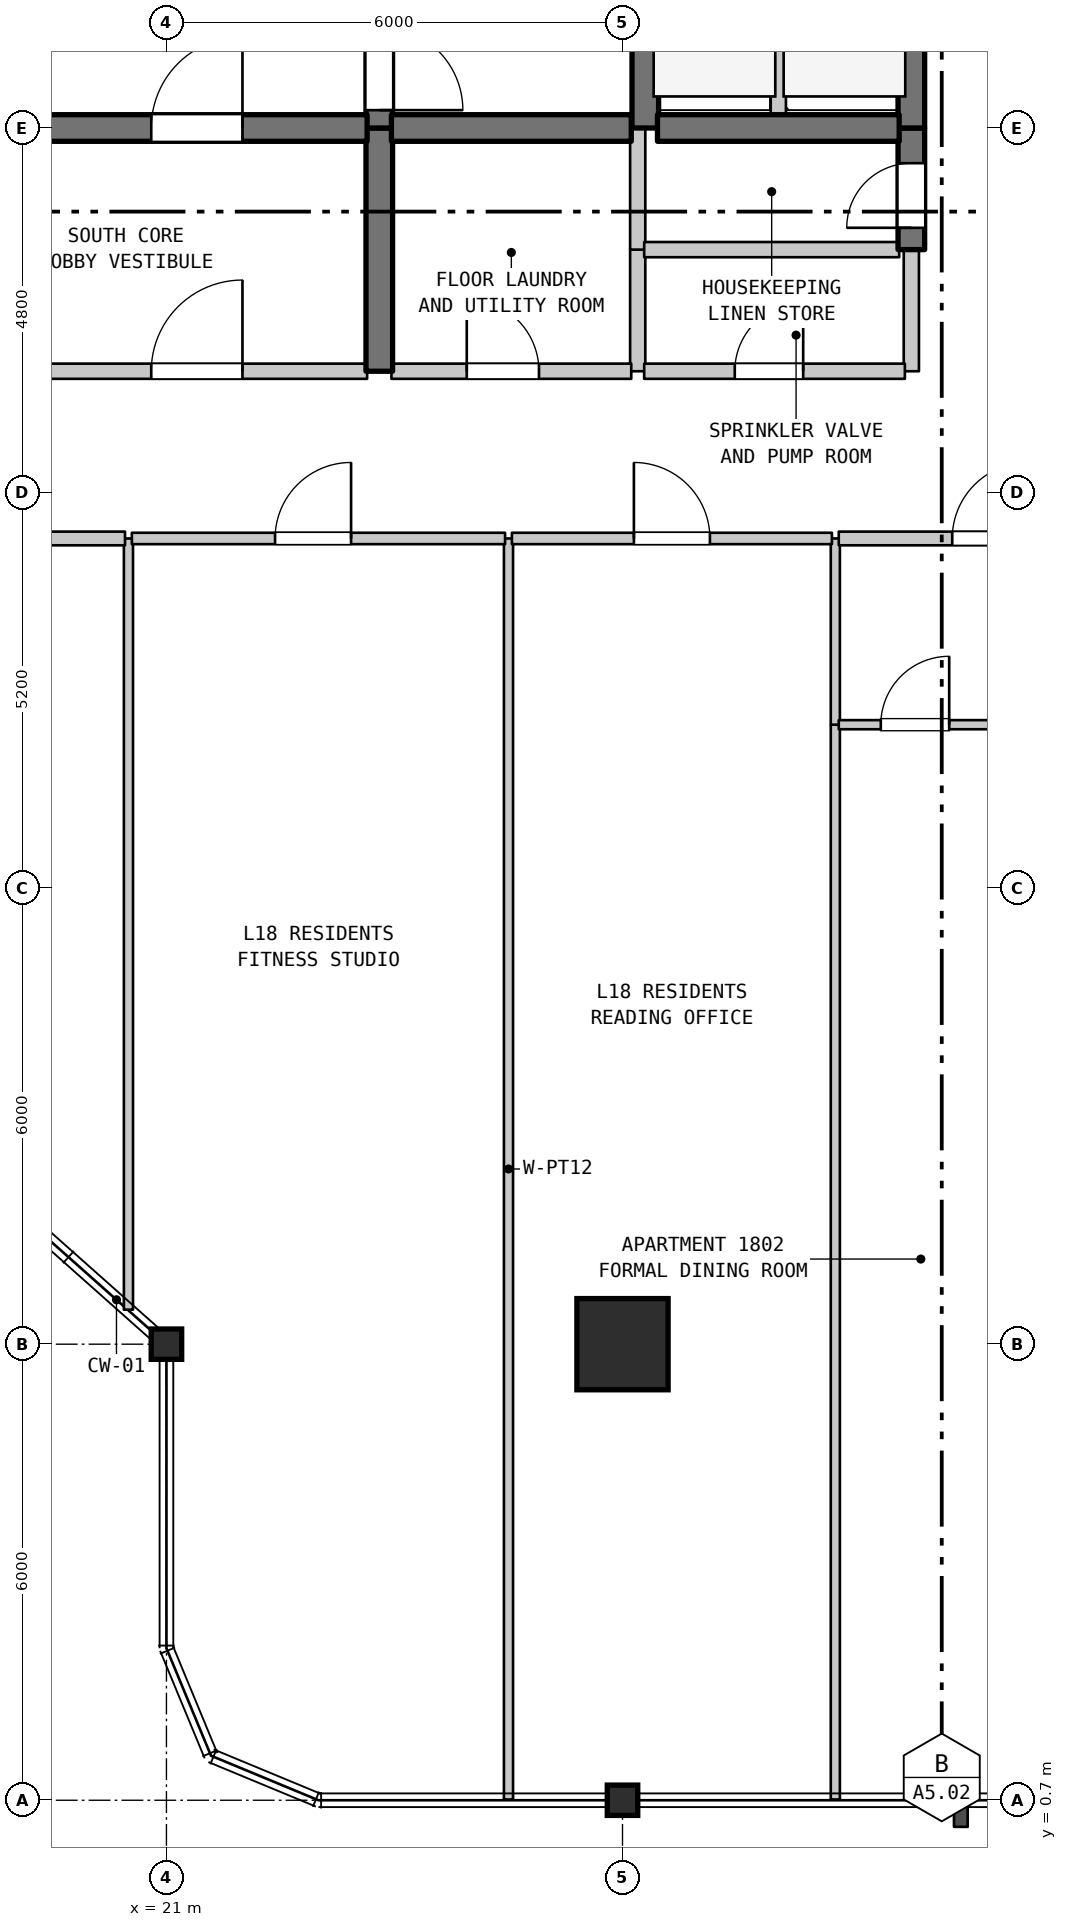
"""IFC4 building model, lengths in metres.
Left out: names, types, materials, properties, quantities, classifications, styles, units other than length and angle.
Written with IfcOpenShell. Run it as: python <this file> out.ifc"""

import sys

from ifc_helpers import new_model, si_unit, direction, frame, frame_2d, origin, origin_2d, place, context, subcontext, project, spatial, rectangle, i_section, extrude, element, fill, save


model = new_model("IFC4")
c1 = context("Model", 3, precision=1e-05, world=origin(), true_north=direction((0.0, 1.0)))
c2 = subcontext(c1, "Body", "Model", "MODEL_VIEW")
j1 = project(units=[si_unit("LENGTHUNIT", "METRE"), si_unit("PLANEANGLEUNIT", "RADIAN")], contexts=[c1])
p1 = place(None, origin())
s1 = spatial("IfcSite", under=j1, at=p1, CompositionType="ELEMENT")
p2 = place(p1, origin())
s2 = spatial("IfcBuilding", under=s1, at=p2, CompositionType="ELEMENT")
p3 = place(p2, frame((0.0, 0.0, 77.5)))
s3 = spatial("IfcBuildingStorey", under=s2, at=p3, CompositionType="ELEMENT", Elevation=77.5)
for number, where, z_axis, x_axis in (
    (1, (21.0, 6.7, 0.0), (0.0, 0.0, 1.0), (1.0, 0.0, 0.0)),
    (2, (27.0, 0.7, 0.0), (0.0, 0.0, 1.0), (1.0, 0.0, 0.0)),
):
    element("IfcColumn", number, at=place(p3, frame(where, z_axis=z_axis, x_axis=x_axis)), inside=s3, PredefinedType="COLUMN", context=c2, shape_type="SweptSolid", body=[
        extrude(i_section(OverallWidth=0.401, OverallDepth=0.399, WebThickness=0.025, FlangeThickness=0.04, FilletRadius=0.015, at=origin_2d()), origin(), (0.0, 0.0, 1.0), 3.7),
    ])
p4 = place(p3, frame((27.0, 6.7, 0.0), z_axis=(0.0, 0.0, 1.0), x_axis=(1.0, 0.0, 0.0)))
e3 = element("IfcColumn", 3, at=p4, inside=s3, PredefinedType="COLUMN", context=c2, shape_type="SweptSolid", body=[
    extrude(rectangle(XDim=1.2, YDim=1.2, at=origin_2d()), origin(), (0.0, 0.0, 1.0), 3.7),
])
p5 = place(p3, frame((20.5, 7.154, 0.0), z_axis=(0.0, 0.0, 1.0), x_axis=(0.0, 1.0, 0.0)))
e4 = element("IfcWall", 4, at=p5, inside=s3, PredefinedType="PARTITIONING", context=c2, shape_type="SweptSolid", body=[
    extrude(rectangle(XDim=10.146, YDim=0.12, at=frame_2d((5.073, 0.0))), origin(), (0.0, 0.0, 1.0), 3.28),
])
p6 = place(p3, frame((23.8, 19.5, 0.0), z_axis=(0.0, 0.0, 1.0), x_axis=(0.0, 1.0, 0.0)))
e5 = element("IfcWall", 5, at=p6, inside=s3, PredefinedType="SHEAR", context=c2, shape_type="SweptSolid", body=[
    extrude(rectangle(XDim=3.2, YDim=0.35, at=frame_2d((1.6, 0.0))), origin(), (0.0, 0.0, 1.0), 3.28),
])
p7 = place(p3, frame((23.8, 22.7, 0.0), z_axis=(0.0, 0.0, 1.0), x_axis=(0.0, 1.0, 0.0)))
e6 = element("IfcWall", 6, at=p7, inside=s3, PredefinedType="SHEAR", context=c2, shape_type="SweptSolid", body=[
    extrude(rectangle(XDim=5.5, YDim=0.35, at=frame_2d((2.75, 0.0))), origin(), (0.0, 0.0, 1.0), 3.28),
])
p8 = place(p7, frame((0.235, 0.0, 0.0)))
e7 = element("IfcOpeningElement", 7, at=p8, cuts=e6, PredefinedType="OPENING", context=c2, shape_type="SweptSolid", body=[
    extrude(rectangle(XDim=1.1, YDim=2.15, at=frame_2d((0.55, 1.075))), frame((0.0, 0.185, 0.0), z_axis=(0.0, -1.0, 0.0), x_axis=(1.0, 0.0, 0.0)), (0.0, 0.0, 1.0), 0.37),
])
p9 = place(p3, frame((25.5, 0.71, 0.0), z_axis=(0.0, 0.0, 1.0), x_axis=(0.0, 1.0, 0.0)))
e8 = element("IfcWall", 8, at=p9, inside=s3, PredefinedType="PARTITIONING", context=c2, shape_type="SweptSolid", body=[
    extrude(rectangle(XDim=16.59, YDim=0.12, at=frame_2d((8.295, 0.0))), origin(), (0.0, 0.0, 1.0), 3.28),
])
p10 = place(p3, frame((27.2, 19.5, 0.0), z_axis=(0.0, 0.0, 1.0), x_axis=(0.0, 1.0, 0.0)))
e9 = element("IfcWall", 9, at=p10, inside=s3, PredefinedType="STANDARD", context=c2, shape_type="SweptSolid", body=[
    extrude(rectangle(XDim=1.6, YDim=0.2, at=frame_2d((0.8, 0.0))), origin(), (0.0, 0.0, 1.0), 3.28),
])
p11 = place(p3, frame((27.2, 21.1, 0.0), z_axis=(0.0, 0.0, 1.0), x_axis=(0.0, 1.0, 0.0)))
e10 = element("IfcWall", 10, at=p11, inside=s3, PredefinedType="STANDARD", context=c2, shape_type="SweptSolid", body=[
    extrude(rectangle(XDim=1.6, YDim=0.2, at=frame_2d((0.8, 0.0))), origin(), (0.0, 0.0, 1.0), 3.28),
])
p12 = place(p3, frame((27.3, 22.7, 0.0), z_axis=(0.0, 0.0, 1.0), x_axis=(0.0, 1.0, 0.0)))
e11 = element("IfcWall", 11, at=p12, inside=s3, PredefinedType="SHEAR", context=c2, shape_type="SweptSolid", body=[
    extrude(rectangle(XDim=2.9, YDim=0.35, at=frame_2d((1.45, 0.0))), origin(), (0.0, 0.0, 1.0), 3.28),
])
p13 = place(p3, frame((29.05, 22.7, 0.0), z_axis=(0.0, 0.0, 1.0), x_axis=(0.0, 1.0, 0.0)))
e12 = element("IfcWall", 12, at=p13, inside=s3, PredefinedType="STANDARD", context=c2, shape_type="SweptSolid", body=[
    extrude(rectangle(XDim=2.9, YDim=0.2, at=frame_2d((1.45, 0.0))), origin(), (0.0, 0.0, 1.0), 3.28),
])
p14 = place(p3, frame((29.8, 0.71, 0.0), z_axis=(0.0, 0.0, 1.0), x_axis=(0.0, 1.0, 0.0)))
e13 = element("IfcWall", 13, at=p14, inside=s3, PredefinedType="PARTITIONING", context=c2, shape_type="SweptSolid", body=[
    extrude(rectangle(XDim=14.14, YDim=0.12, at=frame_2d((7.07, 0.0))), origin(), (0.0, 0.0, 1.0), 3.28),
])
p15 = place(p3, frame((29.8, 14.85, 0.0), z_axis=(0.0, 0.0, 1.0), x_axis=(0.0, 1.0, 0.0)))
e14 = element("IfcWall", 14, at=p15, inside=s3, PredefinedType="PARTITIONING", context=c2, shape_type="SweptSolid", body=[
    extrude(rectangle(XDim=2.45, YDim=0.12, at=frame_2d((1.225, 0.0))), origin(), (0.0, 0.0, 1.0), 3.28),
])
p16 = place(p3, frame((30.8, 19.5, 0.0), z_axis=(0.0, 0.0, 1.0), x_axis=(0.0, 1.0, 0.0)))
e15 = element("IfcWall", 15, at=p16, inside=s3, PredefinedType="STANDARD", context=c2, shape_type="SweptSolid", body=[
    extrude(rectangle(XDim=1.6, YDim=0.2, at=frame_2d((0.8, 0.0))), origin(), (0.0, 0.0, 1.0), 3.28),
])
p17 = place(p3, frame((30.8, 21.1, 0.0), z_axis=(0.0, 0.0, 1.0), x_axis=(0.0, 1.0, 0.0)))
e16 = element("IfcWall", 16, at=p17, inside=s3, PredefinedType="SHEAR", context=c2, shape_type="SweptSolid", body=[
    extrude(rectangle(XDim=1.6, YDim=0.35, at=frame_2d((0.8, 0.0))), origin(), (0.0, 0.0, 1.0), 3.28),
])
p18 = place(p17, frame((0.287, 0.0, 0.0)))
e17 = element("IfcOpeningElement", 17, at=p18, cuts=e16, PredefinedType="OPENING", context=c2, shape_type="SweptSolid", body=[
    extrude(rectangle(XDim=0.85, YDim=2.1, at=frame_2d((0.425, 1.05))), frame((0.0, 0.185, 0.0), z_axis=(0.0, -1.0, 0.0), x_axis=(1.0, 0.0, 0.0)), (0.0, 0.0, 1.0), 0.37),
])
p19 = place(p3, frame((30.8, 22.7, 0.0), z_axis=(0.0, 0.0, 1.0), x_axis=(0.0, 1.0, 0.0)))
e18 = element("IfcWall", 18, at=p19, inside=s3, PredefinedType="SHEAR", context=c2, shape_type="SweptSolid", body=[
    extrude(rectangle(XDim=2.9, YDim=0.35, at=frame_2d((1.45, 0.0))), origin(), (0.0, 0.0, 1.0), 3.28),
])
p20 = place(p3, frame((29.845, 14.85, 0.0), z_axis=(0.0, 0.0, 1.0), x_axis=(1.0, 0.0, 0.0)))
e19 = element("IfcWall", 19, at=p20, inside=s3, PredefinedType="PARTITIONING", context=c2, shape_type="SweptSolid", body=[
    extrude(rectangle(XDim=2.16, YDim=0.12, at=frame_2d((1.08, 0.0))), origin(), (0.0, 0.0, 1.0), 3.28),
])
p21 = place(p20, frame((0.553, 0.0, 0.0)))
e20 = element("IfcOpeningElement", 20, at=p21, cuts=e19, PredefinedType="OPENING", context=c2, shape_type="SweptSolid", body=[
    extrude(rectangle(XDim=0.9, YDim=2.15, at=frame_2d((0.45, 1.075))), frame((0.0, 0.07, 0.0), z_axis=(0.0, -1.0, 0.0), x_axis=(1.0, 0.0, 0.0)), (0.0, 0.0, 1.0), 0.14),
])
p22 = place(p3, frame((18.595, 17.3, 0.0), z_axis=(0.0, 0.0, 1.0), x_axis=(1.0, 0.0, 0.0)))
e21 = element("IfcWall", 21, at=p22, inside=s3, PredefinedType="STANDARD", context=c2, shape_type="SweptSolid", body=[
    extrude(rectangle(XDim=1.86, YDim=0.18, at=frame_2d((0.93, 0.0))), origin(), (0.0, 0.0, 1.0), 3.28),
])
p23 = place(p3, frame((20.545, 17.3, 0.0), z_axis=(0.0, 0.0, 1.0), x_axis=(1.0, 0.0, 0.0)))
e22 = element("IfcWall", 22, at=p23, inside=s3, PredefinedType="STANDARD", context=c2, shape_type="SweptSolid", body=[
    extrude(rectangle(XDim=4.91, YDim=0.15, at=frame_2d((2.455, 0.0))), origin(), (0.0, 0.0, 1.0), 3.28),
])
p24 = place(p23, frame((1.884, 0.0, 0.0)))
e23 = element("IfcOpeningElement", 23, at=p24, cuts=e22, PredefinedType="OPENING", context=c2, shape_type="SweptSolid", body=[
    extrude(rectangle(XDim=1.0, YDim=2.15, at=frame_2d((0.5, 1.075))), frame((0.0, 0.085, 0.0), z_axis=(0.0, -1.0, 0.0), x_axis=(1.0, 0.0, 0.0)), (0.0, 0.0, 1.0), 0.17),
])
p25 = place(p3, frame((25.545, 17.3, 0.0), z_axis=(0.0, 0.0, 1.0), x_axis=(1.0, 0.0, 0.0)))
e24 = element("IfcWall", 24, at=p25, inside=s3, PredefinedType="STANDARD", context=c2, shape_type="SweptSolid", body=[
    extrude(rectangle(XDim=4.21, YDim=0.15, at=frame_2d((2.105, 0.0))), origin(), (0.0, 0.0, 1.0), 3.28),
])
p26 = place(p25, frame((1.605, 0.0, 0.0)))
e25 = element("IfcOpeningElement", 25, at=p26, cuts=e24, PredefinedType="OPENING", context=c2, shape_type="SweptSolid", body=[
    extrude(rectangle(XDim=1.0, YDim=2.15, at=frame_2d((0.5, 1.075))), frame((0.0, 0.085, 0.0), z_axis=(0.0, -1.0, 0.0), x_axis=(1.0, 0.0, 0.0)), (0.0, 0.0, 1.0), 0.17),
])
p27 = place(p3, frame((29.845, 17.3, 0.0), z_axis=(0.0, 0.0, 1.0), x_axis=(1.0, 0.0, 0.0)))
e26 = element("IfcWall", 26, at=p27, inside=s3, PredefinedType="STANDARD", context=c2, shape_type="SweptSolid", body=[
    extrude(rectangle(XDim=4.7, YDim=0.18, at=frame_2d((2.35, 0.0))), origin(), (0.0, 0.0, 1.0), 3.28),
])
p28 = place(p27, frame((1.493, 0.0, 0.0)))
e27 = element("IfcOpeningElement", 27, at=p28, cuts=e26, PredefinedType="OPENING", context=c2, shape_type="SweptSolid", body=[
    extrude(rectangle(XDim=1.0, YDim=2.15, at=frame_2d((0.5, 1.075))), frame((0.0, 0.1, 0.0), z_axis=(0.0, -1.0, 0.0), x_axis=(1.0, 0.0, 0.0)), (0.0, 0.0, 1.0), 0.2),
])
p29 = place(p3, frame((19.16, 19.5, 0.0), z_axis=(0.0, 0.0, 1.0), x_axis=(1.0, 0.0, 0.0)))
e28 = element("IfcWall", 28, at=p29, inside=s3, PredefinedType="STANDARD", context=c2, shape_type="SweptSolid", body=[
    extrude(rectangle(XDim=4.48, YDim=0.2, at=frame_2d((2.24, 0.0))), origin(), (0.0, 0.0, 1.0), 3.28),
])
p30 = place(p29, frame((1.64, 0.0, 0.0)))
e29 = element("IfcOpeningElement", 29, at=p30, cuts=e28, PredefinedType="OPENING", context=c2, shape_type="SweptSolid", body=[
    extrude(rectangle(XDim=1.2, YDim=2.2, at=frame_2d((0.6, 1.1))), frame((0.0, 0.11, 0.0), z_axis=(0.0, -1.0, 0.0), x_axis=(1.0, 0.0, 0.0)), (0.0, 0.0, 1.0), 0.22),
])
p31 = place(p3, frame((23.96, 19.5, 0.0), z_axis=(0.0, 0.0, 1.0), x_axis=(1.0, 0.0, 0.0)))
e30 = element("IfcWall", 30, at=p31, inside=s3, PredefinedType="STANDARD", context=c2, shape_type="SweptSolid", body=[
    extrude(rectangle(XDim=3.155, YDim=0.2, at=frame_2d((1.578, 0.0))), origin(), (0.0, 0.0, 1.0), 3.28),
])
p32 = place(p31, frame((0.991, 0.0, 0.0)))
e31 = element("IfcOpeningElement", 31, at=p32, cuts=e30, PredefinedType="OPENING", context=c2, shape_type="SweptSolid", body=[
    extrude(rectangle(XDim=0.95, YDim=2.15, at=frame_2d((0.475, 1.075))), frame((0.0, 0.11, 0.0), z_axis=(0.0, -1.0, 0.0), x_axis=(1.0, 0.0, 0.0)), (0.0, 0.0, 1.0), 0.22),
])
p33 = place(p3, frame((27.285, 19.5, 0.0), z_axis=(0.0, 0.0, 1.0), x_axis=(1.0, 0.0, 0.0)))
e32 = element("IfcWall", 32, at=p33, inside=s3, PredefinedType="STANDARD", context=c2, shape_type="SweptSolid", body=[
    extrude(rectangle(XDim=3.43, YDim=0.2, at=frame_2d((1.715, 0.0))), origin(), (0.0, 0.0, 1.0), 3.28),
])
p34 = place(p33, frame((1.192, 0.0, 0.0)))
e33 = element("IfcOpeningElement", 33, at=p34, cuts=e32, PredefinedType="OPENING", context=c2, shape_type="SweptSolid", body=[
    extrude(rectangle(XDim=0.9, YDim=2.15, at=frame_2d((0.45, 1.075))), frame((0.0, 0.11, 0.0), z_axis=(0.0, -1.0, 0.0), x_axis=(1.0, 0.0, 0.0)), (0.0, 0.0, 1.0), 0.22),
])
p35 = place(p3, frame((27.285, 21.1, 0.0), z_axis=(0.0, 0.0, 1.0), x_axis=(1.0, 0.0, 0.0)))
e34 = element("IfcWall", 34, at=p35, inside=s3, PredefinedType="STANDARD", context=c2, shape_type="SweptSolid", body=[
    extrude(rectangle(XDim=3.355, YDim=0.2, at=frame_2d((1.677, 0.0))), origin(), (0.0, 0.0, 1.0), 3.28),
])
p36 = place(p3, frame((19.16, 22.7, 0.0), z_axis=(0.0, 0.0, 1.0), x_axis=(1.0, 0.0, 0.0)))
e35 = element("IfcWall", 35, at=p36, inside=s3, PredefinedType="SHEAR", context=c2, shape_type="SweptSolid", body=[
    extrude(rectangle(XDim=4.48, YDim=0.35, at=frame_2d((2.24, 0.0))), origin(), (0.0, 0.0, 1.0), 3.28),
])
p37 = place(p36, frame((1.64, 0.0, 0.0)))
e36 = element("IfcOpeningElement", 36, at=p37, cuts=e35, PredefinedType="OPENING", context=c2, shape_type="SweptSolid", body=[
    extrude(rectangle(XDim=1.2, YDim=2.2, at=frame_2d((0.6, 1.1))), frame((0.0, 0.185, 0.0), z_axis=(0.0, -1.0, 0.0), x_axis=(1.0, 0.0, 0.0)), (0.0, 0.0, 1.0), 0.37),
])
p38 = place(p3, frame((23.96, 22.7, 0.0), z_axis=(0.0, 0.0, 1.0), x_axis=(1.0, 0.0, 0.0)))
e37 = element("IfcWall", 37, at=p38, inside=s3, PredefinedType="SHEAR", context=c2, shape_type="SweptSolid", body=[
    extrude(rectangle(XDim=3.155, YDim=0.35, at=frame_2d((1.578, 0.0))), origin(), (0.0, 0.0, 1.0), 3.28),
])
p39 = place(p3, frame((27.46, 22.7, 0.0), z_axis=(0.0, 0.0, 1.0), x_axis=(1.0, 0.0, 0.0)))
e38 = element("IfcWall", 38, at=p39, inside=s3, PredefinedType="SHEAR", context=c2, shape_type="SweptSolid", body=[
    extrude(rectangle(XDim=3.18, YDim=0.35, at=frame_2d((1.59, 0.0))), origin(), (0.0, 0.0, 1.0), 3.28),
])
p40 = place(p8, frame((1.1, 0.0, 0.0), z_axis=(0.0, 0.0, 1.0), x_axis=(-1.0, 0.0, 0.0)))
e39 = element("IfcDoor", 39, at=p40, inside=s3, OperationType="SINGLE_SWING_LEFT", PredefinedType="DOOR", context=c2, shape_type="SweptSolid", body=[
    extrude(rectangle(XDim=1.1, YDim=2.15, at=frame_2d((0.55, 1.075))), frame((0.0, 0.025, 0.0), z_axis=(0.0, -1.0, 0.0), x_axis=(1.0, 0.0, 0.0)), (0.0, 0.0, 1.0), 0.05),
])
fill(e7, e39)
p41 = place(p18, origin())
e40 = element("IfcDoor", 40, at=p41, inside=s3, OperationType="SINGLE_SWING_LEFT", PredefinedType="DOOR", context=c2, shape_type="SweptSolid", body=[
    extrude(rectangle(XDim=0.85, YDim=2.1, at=frame_2d((0.425, 1.05))), frame((0.0, 0.025, 0.0), z_axis=(0.0, -1.0, 0.0), x_axis=(1.0, 0.0, 0.0)), (0.0, 0.0, 1.0), 0.05),
])
fill(e17, e40)
p42 = place(p21, origin())
e41 = element("IfcDoor", 41, at=p42, inside=s3, OperationType="SINGLE_SWING_RIGHT", PredefinedType="DOOR", context=c2, shape_type="SweptSolid", body=[
    extrude(rectangle(XDim=0.9, YDim=2.15, at=frame_2d((0.45, 1.075))), frame((0.0, 0.025, 0.0), z_axis=(0.0, -1.0, 0.0), x_axis=(1.0, 0.0, 0.0)), (0.0, 0.0, 1.0), 0.05),
])
fill(e20, e41)
p43 = place(p24, origin())
e42 = element("IfcDoor", 42, at=p43, inside=s3, OperationType="SINGLE_SWING_RIGHT", PredefinedType="DOOR", context=c2, shape_type="SweptSolid", body=[
    extrude(rectangle(XDim=1.0, YDim=2.15, at=frame_2d((0.5, 1.075))), frame((0.0, 0.025, 0.0), z_axis=(0.0, -1.0, 0.0), x_axis=(1.0, 0.0, 0.0)), (0.0, 0.0, 1.0), 0.05),
])
fill(e23, e42)
p44 = place(p26, origin())
e43 = element("IfcDoor", 43, at=p44, inside=s3, OperationType="SINGLE_SWING_LEFT", PredefinedType="DOOR", context=c2, shape_type="SweptSolid", body=[
    extrude(rectangle(XDim=1.0, YDim=2.15, at=frame_2d((0.5, 1.075))), frame((0.0, 0.025, 0.0), z_axis=(0.0, -1.0, 0.0), x_axis=(1.0, 0.0, 0.0)), (0.0, 0.0, 1.0), 0.05),
])
fill(e25, e43)
p45 = place(p28, origin())
e44 = element("IfcDoor", 44, at=p45, inside=s3, OperationType="SINGLE_SWING_RIGHT", PredefinedType="DOOR", context=c2, shape_type="SweptSolid", body=[
    extrude(rectangle(XDim=1.0, YDim=2.15, at=frame_2d((0.5, 1.075))), frame((0.0, 0.025, 0.0), z_axis=(0.0, -1.0, 0.0), x_axis=(1.0, 0.0, 0.0)), (0.0, 0.0, 1.0), 0.05),
])
fill(e27, e44)
p46 = place(p30, origin())
e45 = element("IfcDoor", 45, at=p46, inside=s3, OperationType="SINGLE_SWING_RIGHT", PredefinedType="DOOR", context=c2, shape_type="SweptSolid", body=[
    extrude(rectangle(XDim=1.2, YDim=2.2, at=frame_2d((0.6, 1.1))), frame((0.0, 0.025, 0.0), z_axis=(0.0, -1.0, 0.0), x_axis=(1.0, 0.0, 0.0)), (0.0, 0.0, 1.0), 0.05),
])
fill(e29, e45)
p47 = place(p32, origin())
e46 = element("IfcDoor", 46, at=p47, inside=s3, OperationType="SINGLE_SWING_LEFT", PredefinedType="DOOR", context=c2, shape_type="SweptSolid", body=[
    extrude(rectangle(XDim=0.95, YDim=2.15, at=frame_2d((0.475, 1.075))), frame((0.0, 0.025, 0.0), z_axis=(0.0, -1.0, 0.0), x_axis=(1.0, 0.0, 0.0)), (0.0, 0.0, 1.0), 0.05),
])
fill(e31, e46)
p48 = place(p34, origin())
e47 = element("IfcDoor", 47, at=p48, inside=s3, OperationType="SINGLE_SWING_RIGHT", PredefinedType="DOOR", context=c2, shape_type="SweptSolid", body=[
    extrude(rectangle(XDim=0.9, YDim=2.15, at=frame_2d((0.45, 1.075))), frame((0.0, 0.025, 0.0), z_axis=(0.0, -1.0, 0.0), x_axis=(1.0, 0.0, 0.0)), (0.0, 0.0, 1.0), 0.05),
])
fill(e33, e47)
p49 = place(p37, origin())
e48 = element("IfcDoor", 48, at=p49, inside=s3, OperationType="SINGLE_SWING_RIGHT", PredefinedType="DOOR", context=c2, shape_type="SweptSolid", body=[
    extrude(rectangle(XDim=1.2, YDim=2.2, at=frame_2d((0.6, 1.1))), frame((0.0, 0.025, 0.0), z_axis=(0.0, -1.0, 0.0), x_axis=(1.0, 0.0, 0.0)), (0.0, 0.0, 1.0), 0.05),
])
fill(e36, e48)
save(model, sys.argv[1])
